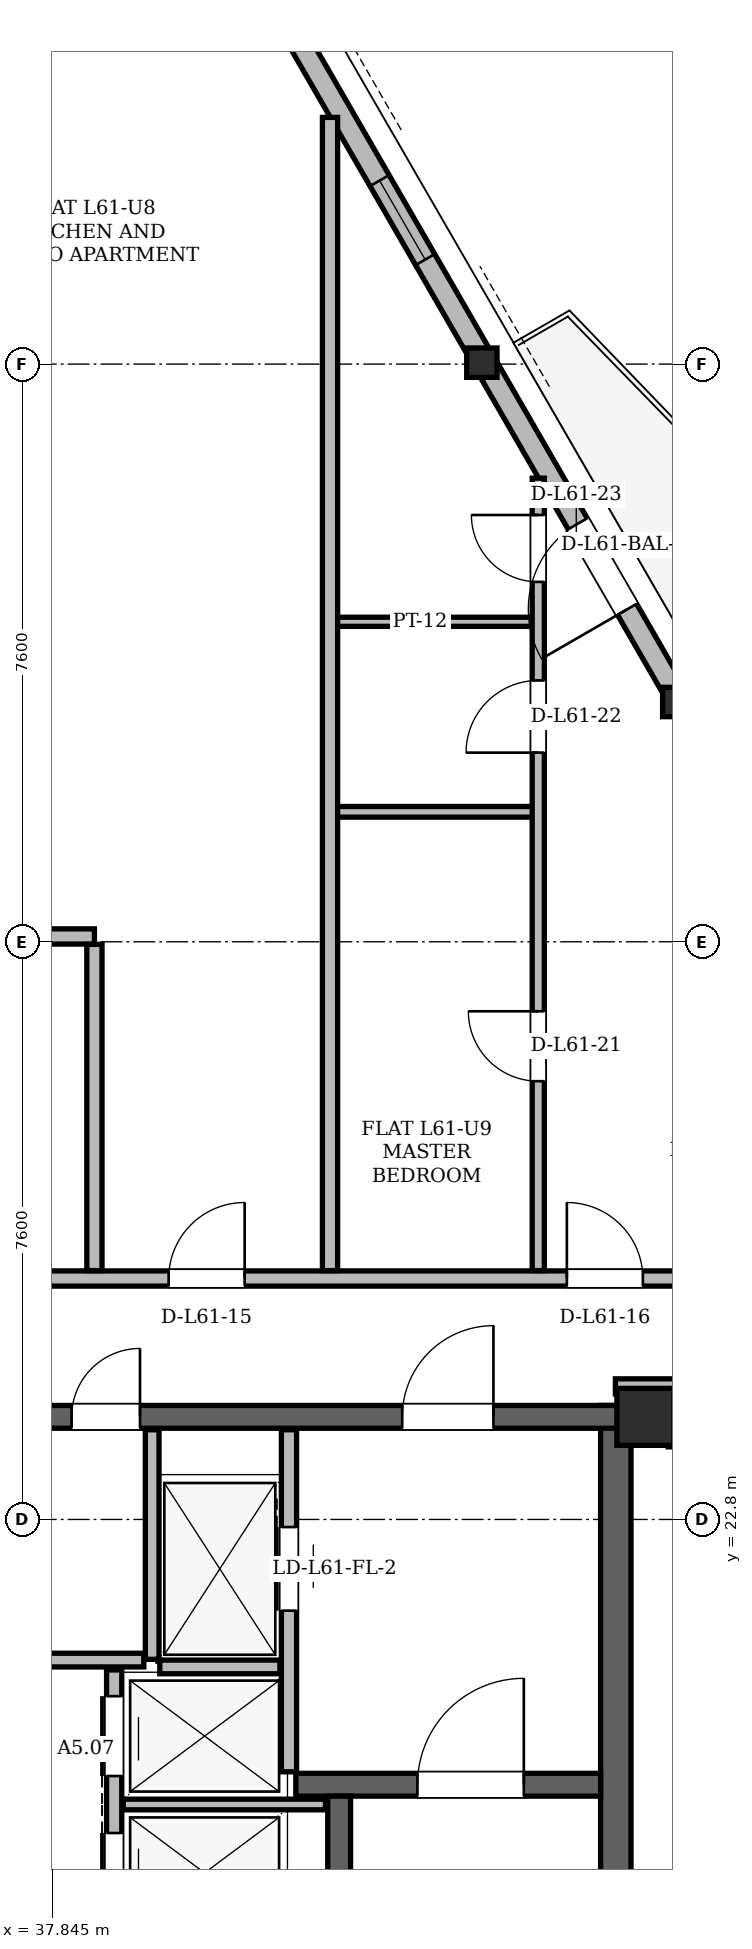
"""IFC4 building model, lengths in metres.
Left out: names, types, materials, properties, quantities, classifications, styles, units other than length and angle.
Written with IfcOpenShell. Run it as: python <this file> out.ifc"""

import sys

from ifc_helpers import new_model, si_unit, direction, frame, frame_2d, origin, origin_2d, place, context, subcontext, project, spatial, rectangle, hollow_rectangle, i_section, extrude, element, fill, save


model = new_model("IFC4")
c1 = context("Model", 3, precision=1e-05, world=origin(), true_north=direction((0.0, 1.0)))
c2 = subcontext(c1, "Body", "Model", "MODEL_VIEW")
j1 = project(units=[si_unit("LENGTHUNIT", "METRE"), si_unit("PLANEANGLEUNIT", "RADIAN")], contexts=[c1])
p1 = place(None, origin())
s1 = spatial("IfcSite", under=j1, at=p1, CompositionType="ELEMENT")
p2 = place(p1, origin())
s2 = spatial("IfcBuilding", under=s1, at=p2, CompositionType="ELEMENT")
p3 = place(p2, frame((0.0, 0.0, 230.7)))
s3 = spatial("IfcBuildingStorey", under=s2, at=p3, CompositionType="ELEMENT", Elevation=230.7)
p4 = place(p3, frame((45.65, 24.15, 0.0), z_axis=(0.0, 0.0, 1.0), x_axis=(1.0, 0.0, 0.0)))
e1 = element("IfcColumn", 1, at=p4, inside=s3, PredefinedType="COLUMN", context=c2, shape_type="SweptSolid", body=[
    extrude(hollow_rectangle(XDim=0.75, YDim=0.75, WallThickness=0.06, at=origin_2d()), origin(), (0.0, 0.0, 1.0), 3.6),
])
p5 = place(p3, frame((46.106, 33.566, 0.005), z_axis=(-0.016926783589, -0.006458009803, 0.999835875585), x_axis=(0.356463384925, -0.934309293119, 0.0)))
e2 = element("IfcColumn", 2, at=p5, inside=s3, PredefinedType="COLUMN", context=c2, shape_type="SweptSolid", body=[
    extrude(i_section(OverallWidth=0.399, OverallDepth=0.386, WebThickness=0.021, FlangeThickness=0.033, at=origin_2d()), origin(), (0.0, 0.0, 1.0), 3.591),
])
p6 = place(p3, frame((43.53, 38.027, 0.005), z_axis=(-0.017946332757, -0.004622540256, 0.999828265885), x_axis=(0.249434236033, -0.968391739894, 0.0)))
e3 = element("IfcColumn", 3, at=p6, inside=s3, PredefinedType="COLUMN", context=c2, shape_type="SweptSolid", body=[
    extrude(i_section(OverallWidth=0.399, OverallDepth=0.386, WebThickness=0.021, FlangeThickness=0.033, at=origin_2d()), origin(), (0.0, 0.0, 1.0), 3.592),
])
p7 = place(p3, frame((45.26, 11.0, 0.0), z_axis=(0.0, 0.0, 1.0), x_axis=(0.0, 1.0, 0.0)))
e4 = element("IfcWall", 4, at=p7, inside=s3, PredefinedType="SHEAR", context=c2, shape_type="SweptSolid", body=[
    extrude(rectangle(XDim=13.3, YDim=0.4, at=frame_2d((6.65, 0.0))), origin(), (0.0, 0.0, 1.0), 3.38),
])
p8 = place(p3, frame((29.65, 24.15, 0.0), z_axis=(0.0, 0.0, 1.0), x_axis=(1.0, 0.0, 0.0)))
e5 = element("IfcWall", 5, at=p8, inside=s3, PredefinedType="SHEAR", context=c2, shape_type="SweptSolid", body=[
    extrude(rectangle(XDim=15.7, YDim=0.3, at=frame_2d((7.85, 0.0))), origin(), (0.0, 0.0, 1.0), 3.38),
])
p9 = place(p8, frame((1.7, 0.0, 0.0)))
e6 = element("IfcOpeningElement", 6, at=p9, cuts=e5, PredefinedType="OPENING", context=c2, shape_type="SweptSolid", body=[
    extrude(rectangle(XDim=1.2, YDim=2.2, at=frame_2d((0.6, 1.1))), frame((0.0, 0.15, 0.0), z_axis=(0.0, -1.0, 0.0), x_axis=(1.0, 0.0, 0.0)), (0.0, 0.0, 1.0), 0.3),
])
p10 = place(p8, frame((12.8, 0.0, 0.0)))
e7 = element("IfcOpeningElement", 7, at=p10, cuts=e5, PredefinedType="OPENING", context=c2, shape_type="SweptSolid", body=[
    extrude(rectangle(XDim=1.2, YDim=2.2, at=frame_2d((0.6, 1.1))), frame((0.0, 0.15, 0.0), z_axis=(0.0, -1.0, 0.0), x_axis=(1.0, 0.0, 0.0)), (0.0, 0.0, 1.0), 0.3),
])
p11 = place(p8, frame((6.55, 0.0, 0.0)))
e8 = element("IfcOpeningElement", 8, at=p11, cuts=e5, PredefinedType="OPENING", context=c2, shape_type="SweptSolid", body=[
    extrude(rectangle(XDim=0.9, YDim=2.05, at=frame_2d((0.45, 1.025))), frame((0.0, 0.15, 0.0), z_axis=(0.0, -1.0, 0.0), x_axis=(1.0, 0.0, 0.0)), (0.0, 0.0, 1.0), 0.3),
])
p12 = place(p8, frame((8.45, 0.0, 0.0)))
e9 = element("IfcOpeningElement", 9, at=p12, cuts=e5, PredefinedType="OPENING", context=c2, shape_type="SweptSolid", body=[
    extrude(rectangle(XDim=0.9, YDim=2.05, at=frame_2d((0.45, 1.025))), frame((0.0, 0.15, 0.0), z_axis=(0.0, -1.0, 0.0), x_axis=(1.0, 0.0, 0.0)), (0.0, 0.0, 1.0), 0.3),
])
p13 = place(p3, frame((41.05, 19.31, 0.0), z_axis=(0.0, 0.0, 1.0), x_axis=(1.0, 0.0, 0.0)))
e10 = element("IfcWall", 10, at=p13, inside=s3, PredefinedType="SHEAR", context=c2, shape_type="SweptSolid", body=[
    extrude(rectangle(XDim=4.01, YDim=0.3, at=frame_2d((2.005, 0.0))), origin(), (0.0, 0.0, 1.0), 3.38),
])
p14 = place(p13, frame((1.6, 0.0, 0.0)))
e11 = element("IfcOpeningElement", 11, at=p14, cuts=e10, PredefinedType="OPENING", context=c2, shape_type="SweptSolid", body=[
    extrude(rectangle(XDim=1.4, YDim=2.2, at=frame_2d((0.7, 1.1))), frame((0.0, 0.15, 0.0), z_axis=(0.0, -1.0, 0.0), x_axis=(1.0, 0.0, 0.0)), (0.0, 0.0, 1.0), 0.3),
])
p15 = place(p3, frame((41.62, 11.54, 0.0), z_axis=(0.0, 0.0, 1.0), x_axis=(0.0, 1.0, 0.0)))
e12 = element("IfcWall", 12, at=p15, inside=s3, PredefinedType="SHEAR", context=c2, shape_type="SweptSolid", body=[
    extrude(rectangle(XDim=7.62, YDim=0.3, at=frame_2d((3.81, 0.0))), origin(), (0.0, 0.0, 1.0), 3.38),
])
p16 = place(p3, frame((58.984, 11.26, 0.0), z_axis=(0.0, 0.0, 1.0), x_axis=(-0.50000331183, 0.86602349169, 0.0)))
e13 = element("IfcWall", 13, at=p16, inside=s3, PredefinedType="SOLIDWALL", context=c2, shape_type="SweptSolid", body=[
    extrude(rectangle(XDim=36.795, YDim=0.29, at=frame_2d((18.397, 0.0))), origin(), (0.0, 0.0, 1.0), 2.677),
])
p17 = place(p16, frame((3.219, 0.0, 0.0)))
e14 = element("IfcOpeningElement", 14, at=p17, cuts=e13, PredefinedType="OPENING", context=c2, shape_type="SweptSolid", body=[
    extrude(rectangle(XDim=1.5, YDim=2.2, at=frame_2d((0.75, 1.1))), frame((0.0, 0.145, 0.0), z_axis=(0.0, -1.0, 0.0), x_axis=(1.0, 0.0, 0.0)), (0.0, 0.0, 1.0), 0.29),
])
p18 = place(p16, frame((27.151, 0.0, 0.0)))
e15 = element("IfcOpeningElement", 15, at=p18, cuts=e13, PredefinedType="OPENING", context=c2, shape_type="SweptSolid", body=[
    extrude(rectangle(XDim=1.3, YDim=2.2, at=frame_2d((0.65, 1.1))), frame((0.0, 0.145, 0.0), z_axis=(0.0, -1.0, 0.0), x_axis=(1.0, 0.0, 0.0)), (0.0, 0.0, 1.0), 0.29),
])
p19 = place(p16, frame((1.169, 0.0, 0.85)))
e16 = element("IfcOpeningElement", 16, at=p19, cuts=e13, PredefinedType="OPENING", context=c2, shape_type="SweptSolid", body=[
    extrude(rectangle(XDim=1.2, YDim=1.48, at=frame_2d((0.6, 0.74))), frame((0.0, 0.145, 0.0), z_axis=(0.0, -1.0, 0.0), x_axis=(1.0, 0.0, 0.0)), (0.0, 0.0, 1.0), 0.29),
])
p20 = place(p16, frame((7.888, 0.0, 0.85)))
e17 = element("IfcOpeningElement", 17, at=p20, cuts=e13, PredefinedType="OPENING", context=c2, shape_type="SweptSolid", body=[
    extrude(rectangle(XDim=1.2, YDim=1.48, at=frame_2d((0.6, 0.74))), frame((0.0, 0.145, 0.0), z_axis=(0.0, -1.0, 0.0), x_axis=(1.0, 0.0, 0.0)), (0.0, 0.0, 1.0), 0.29),
])
p21 = place(p16, frame((32.464, 0.0, 0.85)))
e18 = element("IfcOpeningElement", 18, at=p21, cuts=e13, PredefinedType="OPENING", context=c2, shape_type="SweptSolid", body=[
    extrude(rectangle(XDim=1.2, YDim=1.48, at=frame_2d((0.6, 0.74))), frame((0.0, 0.145, 0.0), z_axis=(0.0, -1.0, 0.0), x_axis=(1.0, 0.0, 0.0)), (0.0, 0.0, 1.0), 0.29),
])
p22 = place(p16, frame((16.904, 0.0, 0.85)))
e19 = element("IfcOpeningElement", 19, at=p22, cuts=e13, PredefinedType="OPENING", context=c2, shape_type="SweptSolid", body=[
    extrude(rectangle(XDim=2.0, YDim=1.717, at=frame_2d((1.0, 0.858))), frame((0.0, 0.145, 0.0), z_axis=(0.0, -1.0, 0.0), x_axis=(1.0, 0.0, 0.0)), (0.0, 0.0, 1.0), 0.29),
])
p23 = place(p16, frame((23.036, 0.0, 0.85)))
e20 = element("IfcOpeningElement", 20, at=p23, cuts=e13, PredefinedType="OPENING", context=c2, shape_type="SweptSolid", body=[
    extrude(rectangle(XDim=1.4, YDim=1.6, at=frame_2d((0.7, 0.8))), frame((0.0, 0.145, 0.0), z_axis=(0.0, -1.0, 0.0), x_axis=(1.0, 0.0, 0.0)), (0.0, 0.0, 1.0), 0.29),
])
p24 = place(p3, frame((40.96, 19.48, 0.0), z_axis=(0.0, 0.0, 1.0), x_axis=(0.0, 1.0, 0.0)))
e21 = element("IfcWall", 21, at=p24, inside=s3, PredefinedType="PARTITIONING", context=c2, shape_type="SweptSolid", body=[
    extrude(rectangle(XDim=4.5, YDim=0.2, at=frame_2d((2.25, 0.0))), origin(), (0.0, 0.0, 1.0), 3.38),
])
p25 = place(p24, frame((2.12, 0.0, 0.0)))
e22 = element("IfcOpeningElement", 22, at=p25, cuts=e21, PredefinedType="OPENING", context=c2, shape_type="SweptSolid", body=[
    extrude(rectangle(XDim=1.1, YDim=2.2, at=frame_2d((0.55, 1.1))), frame((0.0, 0.1, 0.0), z_axis=(0.0, -1.0, 0.0), x_axis=(1.0, 0.0, 0.0)), (0.0, 0.0, 1.0), 0.2),
])
p26 = place(p3, frame((39.16, 20.96, 0.0), z_axis=(0.0, 0.0, 1.0), x_axis=(0.0, 1.0, 0.0)))
e23 = element("IfcWall", 23, at=p26, inside=s3, PredefinedType="PARTITIONING", context=c2, shape_type="SweptSolid", body=[
    extrude(rectangle(XDim=3.02, YDim=0.18, at=frame_2d((1.51, 0.0))), origin(), (0.0, 0.0, 1.0), 3.38),
])
p27 = place(p3, frame((39.26, 20.86, 0.0), z_axis=(0.0, 0.0, 1.0), x_axis=(1.0, 0.0, 0.0)))
e24 = element("IfcWall", 24, at=p27, inside=s3, PredefinedType="PARTITIONING", context=c2, shape_type="SweptSolid", body=[
    extrude(rectangle(XDim=1.58, YDim=0.18, at=frame_2d((0.79, 0.0))), origin(), (0.0, 0.0, 1.0), 3.38),
])
p28 = place(p3, frame((38.66, 17.2, 0.0), z_axis=(0.0, 0.0, 1.0), x_axis=(0.0, 1.0, 0.0)))
e25 = element("IfcWall", 25, at=p28, inside=s3, PredefinedType="PARTITIONING", context=c2, shape_type="SweptSolid", body=[
    extrude(rectangle(XDim=3.62, YDim=0.2, at=frame_2d((1.81, 0.0))), origin(), (0.0, 0.0, 1.0), 3.38),
])
p29 = place(p28, frame((0.425, 0.0, 0.0)))
e26 = element("IfcOpeningElement", 26, at=p29, cuts=e25, PredefinedType="OPENING", context=c2, shape_type="SweptSolid", body=[
    extrude(rectangle(XDim=1.05, YDim=2.15, at=frame_2d((0.525, 1.075))), frame((0.0, 0.1, 0.0), z_axis=(0.0, -1.0, 0.0), x_axis=(1.0, 0.0, 0.0)), (0.0, 0.0, 1.0), 0.2),
])
p30 = place(p28, frame((2.225, 0.0, 0.0)))
e27 = element("IfcOpeningElement", 27, at=p30, cuts=e25, PredefinedType="OPENING", context=c2, shape_type="SweptSolid", body=[
    extrude(rectangle(XDim=1.05, YDim=2.15, at=frame_2d((0.525, 1.075))), frame((0.0, 0.1, 0.0), z_axis=(0.0, -1.0, 0.0), x_axis=(1.0, 0.0, 0.0)), (0.0, 0.0, 1.0), 0.2),
])
p31 = place(p3, frame((38.78, 19.05, 0.0), z_axis=(0.0, 0.0, 1.0), x_axis=(1.0, 0.0, 0.0)))
e28 = element("IfcWall", 28, at=p31, inside=s3, PredefinedType="PARTITIONING", context=c2, shape_type="SweptSolid", body=[
    extrude(rectangle(XDim=2.66, YDim=0.14, at=frame_2d((1.33, 0.0))), origin(), (0.0, 0.0, 1.0), 3.38),
])
p32 = place(p3, frame((35.95, 20.95, 0.0), z_axis=(0.0, 0.0, 1.0), x_axis=(1.0, 0.0, 0.0)))
e29 = element("IfcWall", 29, at=p32, inside=s3, PredefinedType="PARTITIONING", context=c2, shape_type="SweptSolid", body=[
    extrude(rectangle(XDim=3.1, YDim=0.18, at=frame_2d((1.55, 0.0))), origin(), (0.0, 0.0, 1.0), 3.38),
])
p33 = place(p3, frame((45.255, 24.55, 0.0), z_axis=(0.0, 0.0, 1.0), x_axis=(1.0, 0.0, 0.0)))
e30 = element("IfcWall", 30, at=p33, inside=s3, PredefinedType="PARTITIONING", context=c2, shape_type="SweptSolid", body=[
    extrude(rectangle(XDim=0.79, YDim=0.2, at=frame_2d((0.395, 0.0))), origin(), (0.0, 0.0, 1.0), 2.913),
])
p34 = place(p3, frame((25.6, 25.97, 0.0), z_axis=(0.0, 0.0, 1.0), x_axis=(1.0, 0.0, 0.0)))
e31 = element("IfcWall", 31, at=p34, inside=s3, PredefinedType="PARTITIONING", context=c2, shape_type="SweptSolid", body=[
    extrude(rectangle(XDim=21.85, YDim=0.2, at=frame_2d((10.925, 0.0))), origin(), (0.0, 0.0, 1.0), 2.913),
])
p35 = place(p34, frame((3.841, 0.0, 0.0)))
e32 = element("IfcOpeningElement", 32, at=p35, cuts=e31, PredefinedType="OPENING", context=c2, shape_type="SweptSolid", body=[
    extrude(rectangle(XDim=1.0, YDim=2.18, at=frame_2d((0.5, 1.09))), frame((0.0, 0.1, 0.0), z_axis=(0.0, -1.0, 0.0), x_axis=(1.0, 0.0, 0.0)), (0.0, 0.0, 1.0), 0.2),
])
p36 = place(p34, frame((9.75, 0.0, 0.0)))
e33 = element("IfcOpeningElement", 33, at=p36, cuts=e31, PredefinedType="OPENING", context=c2, shape_type="SweptSolid", body=[
    extrude(rectangle(XDim=1.3, YDim=2.2, at=frame_2d((0.65, 1.1))), frame((0.0, 0.1, 0.0), z_axis=(0.0, -1.0, 0.0), x_axis=(1.0, 0.0, 0.0)), (0.0, 0.0, 1.0), 0.2),
])
p37 = place(p34, frame((13.777, 0.0, 0.0)))
e34 = element("IfcOpeningElement", 34, at=p37, cuts=e31, PredefinedType="OPENING", context=c2, shape_type="SweptSolid", body=[
    extrude(rectangle(XDim=1.0, YDim=2.18, at=frame_2d((0.5, 1.09))), frame((0.0, 0.1, 0.0), z_axis=(0.0, -1.0, 0.0), x_axis=(1.0, 0.0, 0.0)), (0.0, 0.0, 1.0), 0.2),
])
p38 = place(p34, frame((19.016, 0.0, 0.0)))
e35 = element("IfcOpeningElement", 35, at=p38, cuts=e31, PredefinedType="OPENING", context=c2, shape_type="SweptSolid", body=[
    extrude(rectangle(XDim=1.0, YDim=2.18, at=frame_2d((0.5, 1.09))), frame((0.0, 0.1, 0.0), z_axis=(0.0, -1.0, 0.0), x_axis=(1.0, 0.0, 0.0)), (0.0, 0.0, 1.0), 0.2),
])
p39 = place(p3, frame((33.6, 30.47, 0.0), z_axis=(0.0, 0.0, 1.0), x_axis=(1.0, 0.0, 0.0)))
e36 = element("IfcWall", 36, at=p39, inside=s3, PredefinedType="PARTITIONING", context=c2, shape_type="SweptSolid", body=[
    extrude(rectangle(XDim=4.8, YDim=0.2, at=frame_2d((2.4, 0.0))), origin(), (0.0, 0.0, 1.0), 3.38),
])
p40 = place(p3, frame((41.45, 32.11, 0.0), z_axis=(0.0, 0.0, 1.0), x_axis=(1.0, 0.0, 0.0)))
e37 = element("IfcWall", 37, at=p40, inside=s3, PredefinedType="PARTITIONING", context=c2, shape_type="SweptSolid", body=[
    extrude(rectangle(XDim=2.786, YDim=0.14, at=frame_2d((1.393, 0.0))), origin(), (0.0, 0.0, 1.0), 2.913),
])
p41 = place(p3, frame((41.45, 34.61, 0.0), z_axis=(0.0, 0.0, 1.0), x_axis=(1.0, 0.0, 0.0)))
e38 = element("IfcWall", 38, at=p41, inside=s3, PredefinedType="PARTITIONING", context=c2, shape_type="SweptSolid", body=[
    extrude(rectangle(XDim=2.786, YDim=0.12, at=frame_2d((1.393, 0.0))), origin(), (0.0, 0.0, 1.0), 2.913),
])
p42 = place(p3, frame((38.4, 26.074, 0.0), z_axis=(0.0, 0.0, 1.0), x_axis=(0.0, 1.0, 0.0)))
e39 = element("IfcWall", 39, at=p42, inside=s3, PredefinedType="PARTITIONING", context=c2, shape_type="SweptSolid", body=[
    extrude(rectangle(XDim=4.292, YDim=0.2, at=frame_2d((2.146, 0.0))), origin(), (0.0, 0.0, 1.0), 3.38),
])
p43 = place(p3, frame((41.5, 26.074, 0.0), z_axis=(0.0, 0.0, 1.0), x_axis=(0.0, 1.0, 0.0)))
e40 = element("IfcWall", 40, at=p43, inside=s3, PredefinedType="PARTITIONING", context=c2, shape_type="SweptSolid", body=[
    extrude(rectangle(XDim=15.172, YDim=0.2, at=frame_2d((7.586, 0.0))), origin(), (0.0, 0.0, 1.0), 2.913),
])
p44 = place(p3, frame((44.24, 26.074, 0.0), z_axis=(0.0, 0.0, 1.0), x_axis=(0.0, 1.0, 0.0)))
e41 = element("IfcWall", 41, at=p44, inside=s3, PredefinedType="PARTITIONING", context=c2, shape_type="SweptSolid", body=[
    extrude(rectangle(XDim=10.426, YDim=0.16, at=frame_2d((5.213, 0.0))), origin(), (0.0, 0.0, 1.0), 2.913),
])
p45 = place(p44, frame((2.492, 0.0, 0.0)))
e42 = element("IfcOpeningElement", 42, at=p45, cuts=e41, PredefinedType="OPENING", context=c2, shape_type="SweptSolid", body=[
    extrude(rectangle(XDim=0.92, YDim=2.12, at=frame_2d((0.46, 1.06))), frame((0.0, 0.08, 0.0), z_axis=(0.0, -1.0, 0.0), x_axis=(1.0, 0.0, 0.0)), (0.0, 0.0, 1.0), 0.16),
])
p46 = place(p44, frame((6.814, 0.0, 0.0)))
e43 = element("IfcOpeningElement", 43, at=p46, cuts=e41, PredefinedType="OPENING", context=c2, shape_type="SweptSolid", body=[
    extrude(rectangle(XDim=0.95, YDim=2.1, at=frame_2d((0.475, 1.05))), frame((0.0, 0.08, 0.0), z_axis=(0.0, -1.0, 0.0), x_axis=(1.0, 0.0, 0.0)), (0.0, 0.0, 1.0), 0.16),
])
p47 = place(p44, frame((9.061, 0.0, 0.0)))
e44 = element("IfcOpeningElement", 44, at=p47, cuts=e41, PredefinedType="OPENING", context=c2, shape_type="SweptSolid", body=[
    extrude(rectangle(XDim=0.88, YDim=2.08, at=frame_2d((0.44, 1.04))), frame((0.0, 0.08, 0.0), z_axis=(0.0, -1.0, 0.0), x_axis=(1.0, 0.0, 0.0)), (0.0, 0.0, 1.0), 0.16),
])
p48 = place(p3, frame((46.05, 23.755, 0.0), z_axis=(0.0, 0.0, 1.0), x_axis=(0.0, 1.0, 0.0)))
e45 = element("IfcWall", 45, at=p48, inside=s3, PredefinedType="PARTITIONING", context=c2, shape_type="SweptSolid", body=[
    extrude(rectangle(XDim=0.565, YDim=0.2, at=frame_2d((0.283, 0.0))), origin(), (0.0, 0.0, 1.0), 3.38),
])
p49 = place(p18, origin())
e46 = element("IfcDoor", 46, at=p49, inside=s3, OperationType="SINGLE_SWING_LEFT", PredefinedType="DOOR", context=c2, shape_type="SweptSolid", body=[
    extrude(rectangle(XDim=1.3, YDim=2.2, at=frame_2d((0.65, 1.1))), frame((0.0, 0.025, 0.0), z_axis=(0.0, -1.0, 0.0), x_axis=(1.0, 0.0, 0.0)), (0.0, 0.0, 1.0), 0.05),
])
fill(e15, e46)
p50 = place(p21, origin())
e47 = element("IfcWindow", 47, at=p50, inside=s3, PartitioningType="SINGLE_PANEL", PredefinedType="WINDOW", context=c2, shape_type="SweptSolid", body=[
    extrude(rectangle(XDim=1.2, YDim=1.48, at=frame_2d((0.6, 0.74))), frame((0.0, 0.03, 0.0), z_axis=(0.0, -1.0, 0.0), x_axis=(1.0, 0.0, 0.0)), (0.0, 0.0, 1.0), 0.06),
])
fill(e18, e47)
p51 = place(p25, origin())
e48 = element("IfcDoor", 48, at=p51, inside=s3, OperationType="SLIDING_TO_RIGHT", PredefinedType="DOOR", context=c2, shape_type="SweptSolid", body=[
    extrude(rectangle(XDim=1.1, YDim=2.2, at=frame_2d((0.55, 1.1))), frame((0.0, 0.025, 0.0), z_axis=(0.0, -1.0, 0.0), x_axis=(1.0, 0.0, 0.0)), (0.0, 0.0, 1.0), 0.05),
])
fill(e22, e48)
p52 = place(p29, origin())
e49 = element("IfcDoor", 49, at=p52, inside=s3, OperationType="SLIDING_TO_RIGHT", PredefinedType="DOOR", context=c2, shape_type="SweptSolid", body=[
    extrude(rectangle(XDim=1.05, YDim=2.15, at=frame_2d((0.525, 1.075))), frame((0.0, 0.025, 0.0), z_axis=(0.0, -1.0, 0.0), x_axis=(1.0, 0.0, 0.0)), (0.0, 0.0, 1.0), 0.05),
])
fill(e26, e49)
p53 = place(p30, origin())
e50 = element("IfcDoor", 50, at=p53, inside=s3, OperationType="SLIDING_TO_LEFT", PredefinedType="DOOR", context=c2, shape_type="SweptSolid", body=[
    extrude(rectangle(XDim=1.05, YDim=2.15, at=frame_2d((0.525, 1.075))), frame((0.0, 0.025, 0.0), z_axis=(0.0, -1.0, 0.0), x_axis=(1.0, 0.0, 0.0)), (0.0, 0.0, 1.0), 0.05),
])
fill(e27, e50)
p54 = place(p14, origin())
e51 = element("IfcDoor", 51, at=p54, inside=s3, OperationType="SINGLE_SWING_RIGHT", PredefinedType="DOOR", context=c2, shape_type="SweptSolid", body=[
    extrude(rectangle(XDim=1.4, YDim=2.2, at=frame_2d((0.7, 1.1))), frame((0.0, 0.025, 0.0), z_axis=(0.0, -1.0, 0.0), x_axis=(1.0, 0.0, 0.0)), (0.0, 0.0, 1.0), 0.05),
])
fill(e11, e51)
p55 = place(p10, origin())
e52 = element("IfcDoor", 52, at=p55, inside=s3, OperationType="SINGLE_SWING_RIGHT", PredefinedType="DOOR", context=c2, shape_type="SweptSolid", body=[
    extrude(rectangle(XDim=1.2, YDim=2.2, at=frame_2d((0.6, 1.1))), frame((0.0, 0.025, 0.0), z_axis=(0.0, -1.0, 0.0), x_axis=(1.0, 0.0, 0.0)), (0.0, 0.0, 1.0), 0.05),
])
fill(e7, e52)
p56 = place(p12, origin())
e53 = element("IfcDoor", 53, at=p56, inside=s3, OperationType="SINGLE_SWING_RIGHT", PredefinedType="DOOR", context=c2, shape_type="SweptSolid", body=[
    extrude(rectangle(XDim=0.9, YDim=2.05, at=frame_2d((0.45, 1.025))), frame((0.0, 0.025, 0.0), z_axis=(0.0, -1.0, 0.0), x_axis=(1.0, 0.0, 0.0)), (0.0, 0.0, 1.0), 0.05),
])
fill(e9, e53)
p57 = place(p37, origin())
e54 = element("IfcDoor", 54, at=p57, inside=s3, OperationType="SINGLE_SWING_RIGHT", PredefinedType="DOOR", context=c2, shape_type="SweptSolid", body=[
    extrude(rectangle(XDim=1.0, YDim=2.18, at=frame_2d((0.5, 1.09))), frame((0.0, 0.025, 0.0), z_axis=(0.0, -1.0, 0.0), x_axis=(1.0, 0.0, 0.0)), (0.0, 0.0, 1.0), 0.05),
])
fill(e34, e54)
p58 = place(p38, origin())
e55 = element("IfcDoor", 55, at=p58, inside=s3, OperationType="SINGLE_SWING_LEFT", PredefinedType="DOOR", context=c2, shape_type="SweptSolid", body=[
    extrude(rectangle(XDim=1.0, YDim=2.18, at=frame_2d((0.5, 1.09))), frame((0.0, 0.025, 0.0), z_axis=(0.0, -1.0, 0.0), x_axis=(1.0, 0.0, 0.0)), (0.0, 0.0, 1.0), 0.05),
])
fill(e35, e55)
p59 = place(p45, origin())
e56 = element("IfcDoor", 56, at=p59, inside=s3, OperationType="SINGLE_SWING_RIGHT", PredefinedType="DOOR", context=c2, shape_type="SweptSolid", body=[
    extrude(rectangle(XDim=0.92, YDim=2.12, at=frame_2d((0.46, 1.06))), frame((0.0, 0.025, 0.0), z_axis=(0.0, -1.0, 0.0), x_axis=(1.0, 0.0, 0.0)), (0.0, 0.0, 1.0), 0.05),
])
fill(e42, e56)
p60 = place(p46, origin())
e57 = element("IfcDoor", 57, at=p60, inside=s3, OperationType="SINGLE_SWING_LEFT", PredefinedType="DOOR", context=c2, shape_type="SweptSolid", body=[
    extrude(rectangle(XDim=0.95, YDim=2.1, at=frame_2d((0.475, 1.05))), frame((0.0, 0.025, 0.0), z_axis=(0.0, -1.0, 0.0), x_axis=(1.0, 0.0, 0.0)), (0.0, 0.0, 1.0), 0.05),
])
fill(e43, e57)
p61 = place(p47, origin())
e58 = element("IfcDoor", 58, at=p61, inside=s3, OperationType="SINGLE_SWING_RIGHT", PredefinedType="DOOR", context=c2, shape_type="SweptSolid", body=[
    extrude(rectangle(XDim=0.88, YDim=2.08, at=frame_2d((0.44, 1.04))), frame((0.0, 0.025, 0.0), z_axis=(0.0, -1.0, 0.0), x_axis=(1.0, 0.0, 0.0)), (0.0, 0.0, 1.0), 0.05),
])
fill(e44, e58)
save(model, sys.argv[1])
